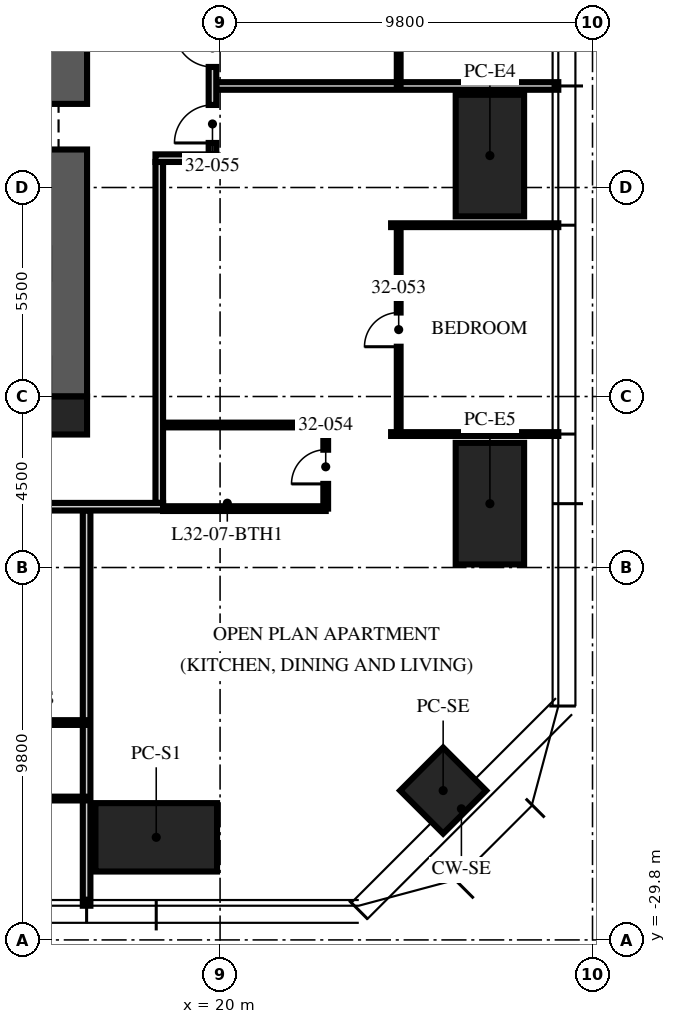
"""IFC4 building model, lengths in metres.
Left out: names, types, materials, properties, quantities, classifications, styles, units other than length and angle.
Written with IfcOpenShell. Run it as: python <this file> out.ifc"""

import sys

from ifc_helpers import new_model, si_unit, direction, frame, frame_2d, origin, origin_2d, place, context, subcontext, project, spatial, rectangle, extrude, element, fill, save


model = new_model("IFC4")
c1 = context("Model", 3, precision=1e-05, world=origin(), true_north=direction((0.0, 1.0)))
c2 = subcontext(c1, "Body", "Model", "MODEL_VIEW")
j1 = project(units=[si_unit("LENGTHUNIT", "METRE"), si_unit("PLANEANGLEUNIT", "RADIAN")], contexts=[c1])
p1 = place(None, origin())
s1 = spatial("IfcSite", under=j1, at=p1, CompositionType="ELEMENT")
p2 = place(p1, origin())
s2 = spatial("IfcBuilding", under=s1, at=p2, CompositionType="ELEMENT")
p3 = place(p2, frame((0.0, 0.0, 129.75)))
s3 = spatial("IfcBuildingStorey", under=s2, at=p3, CompositionType="ELEMENT", Elevation=129.75)
p4 = place(p3, frame((15.5, -15.5, -0.25), z_axis=(0.0, 0.0, 1.0), x_axis=(0.0, 1.0, 0.0)))
e1 = element("IfcWall", 1, at=p4, inside=s3, PredefinedType="SHEAR", context=c2, shape_type="SweptSolid", body=[
    extrude(rectangle(XDim=31.0, YDim=2.0, at=frame_2d((15.5, 0.0))), origin(), (0.0, 0.0, 1.0), 3.75),
])
p5 = place(p4, frame((6.5, 0.0, 0.25)))
e2 = element("IfcOpeningElement", 2, at=p5, cuts=e1, PredefinedType="OPENING", context=c2, shape_type="SweptSolid", body=[
    extrude(rectangle(XDim=1.2, YDim=2.1, at=frame_2d((0.6, 1.05))), frame((0.0, 1.01, 0.0), z_axis=(0.0, -1.0, 0.0), x_axis=(1.0, 0.0, 0.0)), (0.0, 0.0, 1.0), 2.02),
])
p6 = place(p4, frame((23.0, 0.0, 0.25)))
e3 = element("IfcOpeningElement", 3, at=p6, cuts=e1, PredefinedType="OPENING", context=c2, shape_type="SweptSolid", body=[
    extrude(rectangle(XDim=1.8, YDim=2.1, at=frame_2d((0.9, 1.05))), frame((0.0, 1.01, 0.0), z_axis=(0.0, -1.0, 0.0), x_axis=(1.0, 0.0, 0.0)), (0.0, 0.0, 1.0), 2.02),
])
p7 = place(p3, frame((16.0, -16.0, -0.25), z_axis=(0.0, 0.0, 1.0), x_axis=(1.0, 0.0, 0.0)))
e4 = element("IfcColumn", 4, at=p7, inside=s3, PredefinedType="COLUMN", context=c2, shape_type="SweptSolid", body=[
    extrude(rectangle(XDim=1.0, YDim=1.0, at=origin_2d()), origin(), (0.0, 0.0, 1.0), 3.75),
])
for number, where, z_axis, x_axis in (
    (5, (27.1, -9.16, 0.0), (0.0, 0.0, 1.0), (0.0, 1.0, 0.0)),
    (6, (27.1, -18.32, 0.0), (0.0, 0.0, 1.0), (0.0, 1.0, 0.0)),
    (7, (18.32, -27.1, 0.0), (0.0, 0.0, 1.0), (1.0, 0.0, 0.0)),
):
    element("IfcColumn", number, at=place(p3, frame(where, z_axis=z_axis, x_axis=x_axis)), inside=s3, PredefinedType="COLUMN", context=c2, shape_type="SweptSolid", body=[
        extrude(rectangle(XDim=3.2, YDim=1.8, at=origin_2d()), origin(), (0.0, 0.0, 1.0), 3.75),
    ])
p8 = place(p3, frame((25.87, -25.87, 0.0), z_axis=(0.0, 0.0, 1.0), x_axis=(0.707106781187, 0.707106781187, 0.0)))
e8 = element("IfcColumn", 8, at=p8, inside=s3, PredefinedType="COLUMN", context=c2, shape_type="SweptSolid", body=[
    extrude(rectangle(XDim=1.6, YDim=1.6, at=origin_2d()), origin(), (0.0, 0.0, 1.0), 3.75),
])
p9 = place(p3, frame((19.9, -7.328, 0.0), z_axis=(0.0, 0.0, 1.0), x_axis=(1.0, 0.0, 0.0)))
e9 = element("IfcWall", 9, at=p9, inside=s3, PredefinedType="PARTITIONING", context=c2, shape_type="SweptSolid", body=[
    extrude(rectangle(XDim=9.0, YDim=0.2, at=frame_2d((4.5, 0.0))), origin(), (0.0, 0.0, 1.0), 2.81),
])
p10 = place(p3, frame((16.488, -18.5, 0.0), z_axis=(0.0, 0.0, 1.0), x_axis=(0.0, -1.0, 0.0)))
e10 = element("IfcWall", 10, at=p10, inside=s3, PredefinedType="PARTITIONING", context=c2, shape_type="SweptSolid", body=[
    extrude(rectangle(XDim=10.4, YDim=0.2, at=frame_2d((5.2, 0.0))), origin(), (0.0, 0.0, 1.0), 2.81),
])
for number, where, z_axis, x_axis in (
    (11, (24.5, -16.488, 0.0), (0.0, 0.0, 1.0), (1.0, 0.0, 0.0)),
    (12, (24.5, -10.992, 0.0), (0.0, 0.0, 1.0), (1.0, 0.0, 0.0)),
):
    element("IfcWall", number, at=place(p3, frame(where, z_axis=z_axis, x_axis=x_axis)), inside=s3, PredefinedType="PARTITIONING", context=c2, shape_type="SweptSolid", body=[
        extrude(rectangle(XDim=4.4, YDim=0.1, at=frame_2d((2.2, 0.0))), origin(), (0.0, 0.0, 1.0), 2.81),
    ])
p11 = place(p3, frame((24.7, -7.328, 0.0), z_axis=(0.0, 0.0, 1.0), x_axis=(0.0, 1.0, 0.0)))
e13 = element("IfcWall", 13, at=p11, inside=s3, PredefinedType="PARTITIONING", context=c2, shape_type="SweptSolid", body=[
    extrude(rectangle(XDim=5.496, YDim=0.1, at=frame_2d((2.748, 0.0))), origin(), (0.0, 0.0, 1.0), 2.81),
])
p12 = place(p11, frame((2.298, 0.0, 0.0)))
e14 = element("IfcOpeningElement", 14, at=p12, cuts=e13, PredefinedType="OPENING", context=c2, shape_type="SweptSolid", body=[
    extrude(rectangle(XDim=0.9, YDim=2.1, at=frame_2d((0.45, 1.05))), frame((0.0, 0.06, 0.0), z_axis=(0.0, -1.0, 0.0), x_axis=(1.0, 0.0, 0.0)), (0.0, 0.0, 1.0), 0.12),
])
p13 = place(p3, frame((10.992, -26.08, 0.0), z_axis=(0.0, 0.0, 1.0), x_axis=(1.0, 0.0, 0.0)))
e15 = element("IfcWall", 15, at=p13, inside=s3, PredefinedType="PARTITIONING", context=c2, shape_type="SweptSolid", body=[
    extrude(rectangle(XDim=5.496, YDim=0.1, at=frame_2d((2.748, 0.0))), origin(), (0.0, 0.0, 1.0), 2.81),
])
p14 = place(p13, frame((0.15, 0.0, 0.0)))
e16 = element("IfcOpeningElement", 16, at=p14, cuts=e15, PredefinedType="OPENING", context=c2, shape_type="SweptSolid", body=[
    extrude(rectangle(XDim=0.9, YDim=2.1, at=frame_2d((0.45, 1.05))), frame((0.0, 0.06, 0.0), z_axis=(0.0, -1.0, 0.0), x_axis=(1.0, 0.0, 0.0)), (0.0, 0.0, 1.0), 0.12),
])
p15 = place(p13, frame((2.898, 0.0, 0.0)))
e17 = element("IfcOpeningElement", 17, at=p15, cuts=e15, PredefinedType="OPENING", context=c2, shape_type="SweptSolid", body=[
    extrude(rectangle(XDim=0.9, YDim=2.1, at=frame_2d((0.45, 1.05))), frame((0.0, 0.06, 0.0), z_axis=(0.0, -1.0, 0.0), x_axis=(1.0, 0.0, 0.0)), (0.0, 0.0, 1.0), 0.12),
])
p16 = place(p3, frame((12.192, -24.08, 0.0), z_axis=(0.0, 0.0, 1.0), x_axis=(1.0, 0.0, 0.0)))
e18 = element("IfcWall", 18, at=p16, inside=s3, PredefinedType="PARTITIONING", context=c2, shape_type="SweptSolid", body=[
    extrude(rectangle(XDim=4.296, YDim=0.125, at=frame_2d((2.148, 0.0))), origin(), (0.0, 0.0, 1.0), 2.81),
])
p17 = place(p3, frame((24.7, -16.488, 0.0), z_axis=(0.0, 0.0, 1.0), x_axis=(0.0, 1.0, 0.0)))
e19 = element("IfcWall", 19, at=p17, inside=s3, PredefinedType="PARTITIONING", context=c2, shape_type="SweptSolid", body=[
    extrude(rectangle(XDim=5.496, YDim=0.1, at=frame_2d((2.748, 0.0))), origin(), (0.0, 0.0, 1.0), 2.81),
])
p18 = place(p17, frame((2.298, 0.0, 0.0)))
e20 = element("IfcOpeningElement", 20, at=p18, cuts=e19, PredefinedType="OPENING", context=c2, shape_type="SweptSolid", body=[
    extrude(rectangle(XDim=0.9, YDim=2.1, at=frame_2d((0.45, 1.05))), frame((0.0, 0.06, 0.0), z_axis=(0.0, -1.0, 0.0), x_axis=(1.0, 0.0, 0.0)), (0.0, 0.0, 1.0), 0.12),
])
p19 = place(p3, frame((22.78, -18.45, 0.0), z_axis=(0.0, 0.0, 1.0), x_axis=(0.0, 1.0, 0.0)))
e21 = element("IfcWall", 21, at=p19, inside=s3, PredefinedType="PARTITIONING", context=c2, shape_type="SweptSolid", body=[
    extrude(rectangle(XDim=2.2, YDim=0.125, at=frame_2d((1.1, 0.0))), origin(), (0.0, 0.0, 1.0), 2.7),
])
p20 = place(p19, frame((0.65, 0.0, 0.0)))
e22 = element("IfcOpeningElement", 22, at=p20, cuts=e21, PredefinedType="OPENING", context=c2, shape_type="SweptSolid", body=[
    extrude(rectangle(XDim=0.9, YDim=2.1, at=frame_2d((0.45, 1.05))), frame((0.0, 0.073, 0.0), z_axis=(0.0, -1.0, 0.0), x_axis=(1.0, 0.0, 0.0)), (0.0, 0.0, 1.0), 0.145),
])
p21 = place(p3, frame((18.5, -18.45, 0.0), z_axis=(0.0, 0.0, 1.0), x_axis=(1.0, 0.0, 0.0)))
e23 = element("IfcWall", 23, at=p21, inside=s3, PredefinedType="PARTITIONING", context=c2, shape_type="SweptSolid", body=[
    extrude(rectangle(XDim=4.28, YDim=0.125, at=frame_2d((2.14, 0.0))), origin(), (0.0, 0.0, 1.0), 2.3),
])
p22 = place(p3, frame((18.5, -16.25, 0.0), z_axis=(0.0, 0.0, 1.0), x_axis=(1.0, 0.0, 0.0)))
e24 = element("IfcWall", 24, at=p22, inside=s3, PredefinedType="PARTITIONING", context=c2, shape_type="SweptSolid", body=[
    extrude(rectangle(XDim=4.28, YDim=0.125, at=frame_2d((2.14, 0.0))), origin(), (0.0, 0.0, 1.0), 3.5),
])
p23 = place(p3, frame((18.4, -18.3, 0.0), z_axis=(0.0, 0.0, 1.0), x_axis=(0.0, 1.0, 0.0)))
e25 = element("IfcWall", 25, at=p23, inside=s3, PredefinedType="PARTITIONING", context=c2, shape_type="SweptSolid", body=[
    extrude(rectangle(XDim=8.972, YDim=0.2, at=frame_2d((4.486, 0.0))), origin(), (0.0, 0.0, 1.0), 2.3),
])
p24 = place(p3, frame((18.3, -9.228, 0.0), z_axis=(0.0, 0.0, 1.0), x_axis=(1.0, 0.0, 0.0)))
e26 = element("IfcWall", 26, at=p24, inside=s3, PredefinedType="PARTITIONING", context=c2, shape_type="SweptSolid", body=[
    extrude(rectangle(XDim=1.6, YDim=0.2, at=frame_2d((0.8, 0.0))), origin(), (0.0, 0.0, 1.0), 2.7),
])
p25 = place(p3, frame((19.8, -9.128, 0.0), z_axis=(0.0, 0.0, 1.0), x_axis=(0.0, 1.0, 0.0)))
e27 = element("IfcWall", 27, at=p25, inside=s3, PredefinedType="PARTITIONING", context=c2, shape_type="SweptSolid", body=[
    extrude(rectangle(XDim=3.6, YDim=0.2, at=frame_2d((1.8, 0.0))), origin(), (0.0, 0.0, 1.0), 2.7),
])
p26 = place(p25, frame((2.3, 0.0, 0.0)))
e28 = element("IfcOpeningElement", 28, at=p26, cuts=e27, PredefinedType="OPENING", context=c2, shape_type="SweptSolid", body=[
    extrude(rectangle(XDim=1.0, YDim=2.2, at=frame_2d((0.5, 1.1))), frame((0.0, 0.11, 0.0), z_axis=(0.0, -1.0, 0.0), x_axis=(1.0, 0.0, 0.0)), (0.0, 0.0, 1.0), 0.22),
])
p27 = place(p25, frame((0.3, 0.0, 0.0)))
e29 = element("IfcOpeningElement", 29, at=p27, cuts=e27, PredefinedType="OPENING", context=c2, shape_type="SweptSolid", body=[
    extrude(rectangle(XDim=1.0, YDim=2.2, at=frame_2d((0.5, 1.1))), frame((0.0, 0.11, 0.0), z_axis=(0.0, -1.0, 0.0), x_axis=(1.0, 0.0, 0.0)), (0.0, 0.0, 1.0), 0.22),
])
p28 = place(p3, frame((18.5, -18.4, 0.0), z_axis=(0.0, 0.0, 1.0), x_axis=(-1.0, 0.0, 0.0)))
e30 = element("IfcWall", 30, at=p28, inside=s3, PredefinedType="PARTITIONING", context=c2, shape_type="SweptSolid", body=[
    extrude(rectangle(XDim=12.9, YDim=0.2, at=frame_2d((6.45, 0.0))), origin(), (0.0, 0.0, 1.0), 2.3),
])
p29 = place(p26, origin())
e31 = element("IfcDoor", 31, at=p29, inside=s3, OperationType="SINGLE_SWING_RIGHT", PredefinedType="DOOR", context=c2, shape_type="SweptSolid", body=[
    extrude(rectangle(XDim=1.0, YDim=2.2, at=frame_2d((0.5, 1.1))), frame((0.0, 0.025, 0.0), z_axis=(0.0, -1.0, 0.0), x_axis=(1.0, 0.0, 0.0)), (0.0, 0.0, 1.0), 0.05),
])
fill(e28, e31)
p30 = place(p18, origin())
e32 = element("IfcDoor", 32, at=p30, inside=s3, OperationType="SINGLE_SWING_LEFT", PredefinedType="DOOR", context=c2, shape_type="SweptSolid", body=[
    extrude(rectangle(XDim=0.9, YDim=2.1, at=frame_2d((0.45, 1.05))), frame((0.0, 0.025, 0.0), z_axis=(0.0, -1.0, 0.0), x_axis=(1.0, 0.0, 0.0)), (0.0, 0.0, 1.0), 0.05),
])
fill(e20, e32)
p31 = place(p20, origin())
e33 = element("IfcDoor", 33, at=p31, inside=s3, OperationType="SINGLE_SWING_LEFT", PredefinedType="DOOR", context=c2, shape_type="SweptSolid", body=[
    extrude(rectangle(XDim=0.9, YDim=2.1, at=frame_2d((0.45, 1.05))), frame((0.0, 0.025, 0.0), z_axis=(0.0, -1.0, 0.0), x_axis=(1.0, 0.0, 0.0)), (0.0, 0.0, 1.0), 0.05),
])
fill(e22, e33)
p32 = place(p27, origin())
e34 = element("IfcDoor", 34, at=p32, inside=s3, OperationType="SINGLE_SWING_LEFT", PredefinedType="DOOR", context=c2, shape_type="SweptSolid", body=[
    extrude(rectangle(XDim=1.0, YDim=2.2, at=frame_2d((0.5, 1.1))), frame((0.0, 0.025, 0.0), z_axis=(0.0, -1.0, 0.0), x_axis=(1.0, 0.0, 0.0)), (0.0, 0.0, 1.0), 0.05),
])
fill(e29, e34)
save(model, sys.argv[1])
